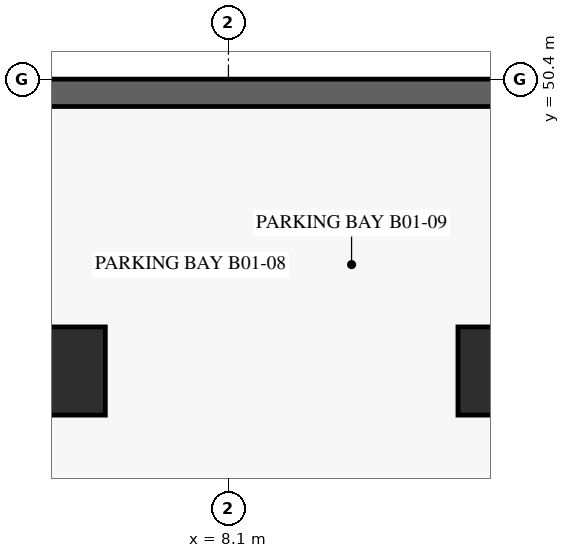
"""IFC4 building model, lengths in metres.
Left out: names, types, materials, properties, quantities, classifications, styles, units other than length and angle.
Written with IfcOpenShell. Run it as: python <this file> out.ifc"""

import sys

from ifc_helpers import new_model, si_unit, direction, frame, frame_2d, origin, origin_2d, place, context, subcontext, project, spatial, rectangle, extrude, source, transform, mapped, element, save


model = new_model("IFC4")
c1 = context("Model", 3, precision=1e-05, world=origin(), true_north=direction((0.0, 1.0)))
c2 = subcontext(c1, "Body", "Model", "MODEL_VIEW")
j1 = project(units=[si_unit("LENGTHUNIT", "METRE"), si_unit("PLANEANGLEUNIT", "RADIAN")], contexts=[c1])
p1 = place(None, origin())
s1 = spatial("IfcSite", under=j1, at=p1, CompositionType="ELEMENT")
p2 = place(p1, origin())
s2 = spatial("IfcBuilding", under=s1, at=p2, CompositionType="ELEMENT")
p3 = place(p2, frame((0.0, 0.0, -3.6)))
s3 = spatial("IfcBuildingStorey", under=s2, at=p3, CompositionType="ELEMENT", Elevation=-3.6)
p4 = place(p3, frame((64.575, 50.175, -0.36), z_axis=(0.0, 0.0, 1.0), x_axis=(-1.0, 0.0, 0.0)))
e1 = element("IfcWall", 1, at=p4, inside=s3, PredefinedType="USERDEFINED", context=c2, shape_type="SweptSolid", body=[
    extrude(rectangle(XDim=64.35, YDim=0.45, at=frame_2d((32.175, 0.0))), origin(), (0.0, 0.0, 1.0), 3.578),
])
m1 = source(origin(), c2, "Body", "SweptSolid", [
    extrude(rectangle(XDim=1.45, YDim=1.45, at=origin_2d()), origin(), (0.0, 0.0, 1.0), 3.58),
])
for number, where, z_axis, x_axis in (
    (2, (12.6, 45.6, -0.36), (0.0, 0.0, 1.0), (1.0, 0.0, 0.0)),
    (3, (5.35, 45.6, -0.36), (0.0, 0.0, 1.0), (1.0, 0.0, 0.0)),
):
    element("IfcColumn", number, at=place(p3, frame(where, z_axis=z_axis, x_axis=x_axis)), inside=s3, PredefinedType="COLUMN", context=c2, shape_type="MappedRepresentation", body=[
        mapped(m1, transform((0.0, 0.0, 0.0), scale=1.0)),
    ])
save(model, sys.argv[1])
